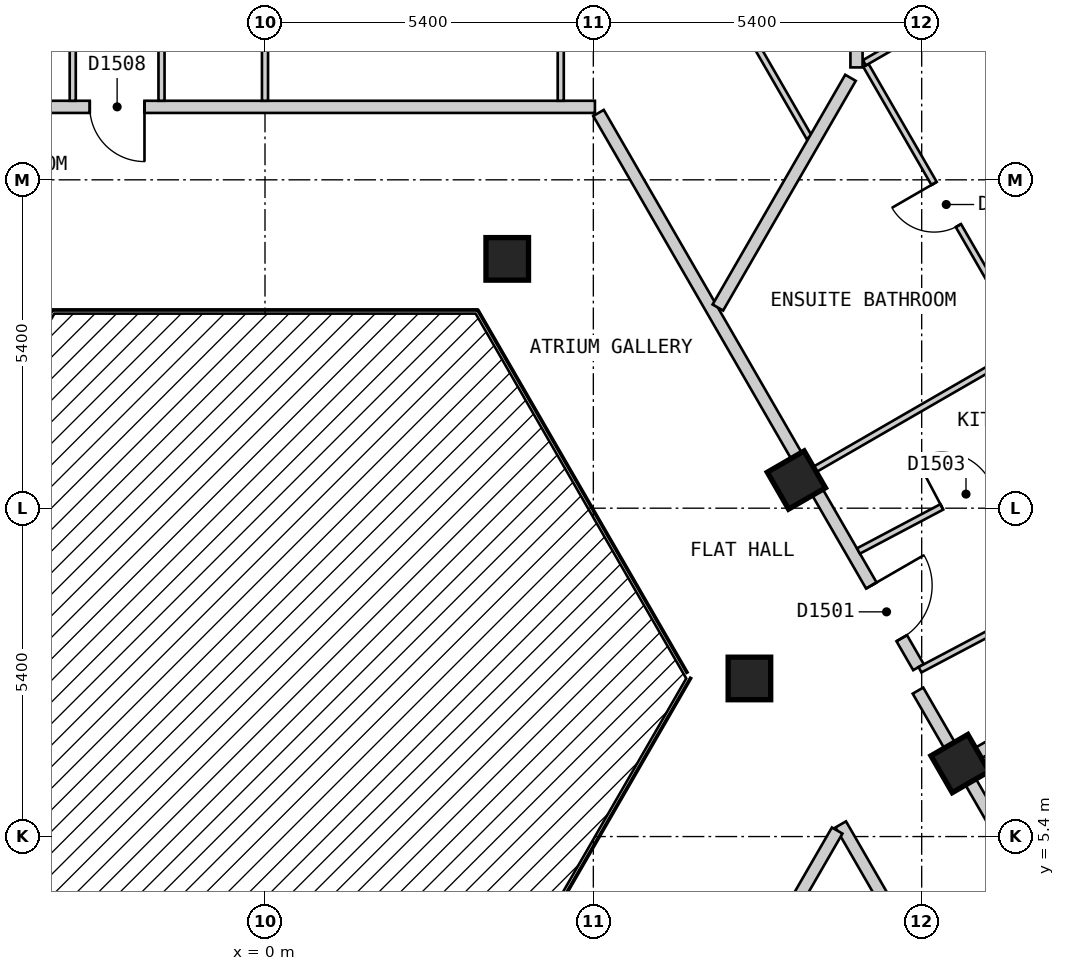
"""IFC4 building model, lengths in metres.
Left out: names, types, materials, properties, quantities, classifications, styles, units other than length and angle.
Written with IfcOpenShell. Run it as: python <this file> out.ifc"""

import sys

from ifc_helpers import new_model, si_unit, direction, frame, frame_2d, origin, origin_2d, place, context, subcontext, project, spatial, rectangle, extrude, element, fill, save


model = new_model("IFC4")
c1 = context("Model", 3, precision=1e-05, world=origin(), true_north=direction((0.0, 1.0)))
c2 = subcontext(c1, "Body", "Model", "MODEL_VIEW")
j1 = project(units=[si_unit("LENGTHUNIT", "METRE"), si_unit("PLANEANGLEUNIT", "RADIAN")], contexts=[c1])
p1 = place(None, origin())
s1 = spatial("IfcSite", under=j1, at=p1, CompositionType="ELEMENT")
p2 = place(p1, origin())
s2 = spatial("IfcBuilding", under=s1, at=p2, CompositionType="ELEMENT")
p3 = place(p2, frame((0.0, 0.0, 190.2)))
s3 = spatial("IfcBuildingStorey", under=s2, at=p3, CompositionType="ELEMENT", Elevation=190.2)
for number, where, z_axis, x_axis in (
    (1, (11.431, 6.6, 0.0), (0.0, 0.0, 1.0), (-0.5, 0.866, 0.0)),
    (2, (7.967, 8.0, 0.0), (0.0, 0.0, 1.0), (1.0, 0.0, 0.0)),
    (3, (8.739, 11.263, 0.0), (0.0, 0.0, 1.0), (-0.5, 0.866, 0.0)),
    (4, (3.984, 14.9, 0.0), (0.0, 0.0, 1.0), (1.0, 0.0, 0.0)),
):
    element("IfcColumn", number, at=place(p3, frame(where, z_axis=z_axis, x_axis=x_axis)), inside=s3, PredefinedType="COLUMN", context=c2, shape_type="SweptSolid", body=[
        extrude(rectangle(XDim=0.7, YDim=0.7, at=origin_2d()), origin(), (0.0, 0.0, 1.0), 3.0),
    ])
p4 = place(p3, frame((9.469, 5.6, 0.0), z_axis=(0.0, 0.0, 1.0), x_axis=(0.499964524401, -0.866045884662, 0.0)))
e5 = element("IfcWall", 5, at=p4, inside=s3, PredefinedType="PARTITIONING", context=c2, shape_type="SweptSolid", body=[
    extrude(rectangle(XDim=7.042, YDim=0.2, at=frame_2d((3.521, 0.0))), origin(), (0.0, 0.0, 1.0), 2.7),
])
p5 = place(p4, frame((3.129, 0.0, 0.0)))
e6 = element("IfcOpeningElement", 6, at=p5, cuts=e5, PredefinedType="OPENING", context=c2, shape_type="SweptSolid", body=[
    extrude(rectangle(XDim=0.9, YDim=2.1, at=frame_2d((0.45, 1.05))), frame((0.0, 0.11, 0.0), z_axis=(0.0, -1.0, 0.0), x_axis=(1.0, 0.0, 0.0)), (0.0, 0.0, 1.0), 0.22),
])
p6 = place(p3, frame((10.739, 7.8, 0.0), z_axis=(0.0, 0.0, 1.0), x_axis=(0.500023726918, -0.866011704609, 0.0)))
e7 = element("IfcWall", 7, at=p6, inside=s3, PredefinedType="PARTITIONING", context=c2, shape_type="SweptSolid", body=[
    extrude(rectangle(XDim=9.47, YDim=0.2, at=frame_2d((4.735, 0.0))), origin(), (0.0, 0.0, 1.0), 2.7),
])
p7 = place(p6, frame((8.168, 0.0, 0.0)))
e8 = element("IfcOpeningElement", 8, at=p7, cuts=e7, PredefinedType="OPENING", context=c2, shape_type="SweptSolid", body=[
    extrude(rectangle(XDim=1.0, YDim=2.1, at=frame_2d((0.5, 1.05))), frame((0.0, 0.11, 0.0), z_axis=(0.0, -1.0, 0.0), x_axis=(1.0, 0.0, 0.0)), (0.0, 0.0, 1.0), 0.22),
])
p8 = place(p6, frame((3.578, 0.0, 0.0)))
e9 = element("IfcOpeningElement", 9, at=p8, cuts=e7, PredefinedType="OPENING", context=c2, shape_type="SweptSolid", body=[
    extrude(rectangle(XDim=1.0, YDim=2.1, at=frame_2d((0.5, 1.05))), frame((0.0, 0.11, 0.0), z_axis=(0.0, -1.0, 0.0), x_axis=(1.0, 0.0, 0.0)), (0.0, 0.0, 1.0), 0.22),
])
p9 = place(p3, frame((5.485, 17.3, 0.0), z_axis=(0.0, 0.0, 1.0), x_axis=(0.499998905622, -0.866026035623, 0.0)))
e10 = element("IfcWall", 10, at=p9, inside=s3, PredefinedType="PARTITIONING", context=c2, shape_type="SweptSolid", body=[
    extrude(rectangle(XDim=10.524, YDim=0.2, at=frame_2d((5.262, 0.0))), origin(), (0.0, 0.0, 1.0), 2.7),
])
p10 = place(p9, frame((8.974, 0.0, 0.0)))
e11 = element("IfcOpeningElement", 11, at=p10, cuts=e10, PredefinedType="OPENING", context=c2, shape_type="SweptSolid", body=[
    extrude(rectangle(XDim=1.0, YDim=2.1, at=frame_2d((0.5, 1.05))), frame((0.0, 0.11, 0.0), z_axis=(0.0, -1.0, 0.0), x_axis=(1.0, 0.0, 0.0)), (0.0, 0.0, 1.0), 0.22),
])
p11 = place(p3, frame((-5.311, 17.4, 0.0), z_axis=(0.0, 0.0, 1.0), x_axis=(1.0, 0.0, 0.0)))
e12 = element("IfcWall", 12, at=p11, inside=s3, PredefinedType="PARTITIONING", context=c2, shape_type="SweptSolid", body=[
    extrude(rectangle(XDim=10.737, YDim=0.2, at=frame_2d((5.369, 0.0))), origin(), (0.0, 0.0, 1.0), 2.7),
])
p12 = place(p11, frame((2.429, 0.0, 0.0)))
e13 = element("IfcOpeningElement", 13, at=p12, cuts=e12, PredefinedType="OPENING", context=c2, shape_type="SweptSolid", body=[
    extrude(rectangle(XDim=0.9, YDim=2.1, at=frame_2d((0.45, 1.05))), frame((0.0, 0.11, 0.0), z_axis=(0.0, -1.0, 0.0), x_axis=(1.0, 0.0, 0.0)), (0.0, 0.0, 1.0), 0.22),
])
p13 = place(p3, frame((7.028, 1.373, 0.0), z_axis=(0.0, 0.0, 1.0), x_axis=(0.499953126767, 0.866052464367, 0.0)))
e14 = element("IfcWall", 14, at=p13, inside=s3, PredefinedType="PARTITIONING", context=c2, shape_type="SweptSolid", body=[
    extrude(rectangle(XDim=4.764, YDim=0.2, at=frame_2d((2.382, 0.0))), origin(), (0.0, 0.0, 1.0), 2.7),
])
p14 = place(p3, frame((7.073, 20.15, 0.0), z_axis=(0.0, 0.0, 1.0), x_axis=(0.499917691695, -0.866072919292, 0.0)))
e15 = element("IfcWall", 15, at=p14, inside=s3, PredefinedType="PARTITIONING", context=c2, shape_type="SweptSolid", body=[
    extrude(rectangle(XDim=3.753, YDim=0.1, at=frame_2d((1.876, 0.0))), origin(), (0.0, 0.0, 1.0), 2.7),
])
p15 = place(p14, frame((0.96, 0.0, 0.0)))
e16 = element("IfcOpeningElement", 16, at=p15, cuts=e15, PredefinedType="OPENING", context=c2, shape_type="SweptSolid", body=[
    extrude(rectangle(XDim=0.8, YDim=2.1, at=frame_2d((0.4, 1.05))), frame((0.0, 0.06, 0.0), z_axis=(0.0, -1.0, 0.0), x_axis=(1.0, 0.0, 0.0)), (0.0, 0.0, 1.0), 0.12),
])
p16 = place(p3, frame((9.883, 18.082, 0.0), z_axis=(0.0, 0.0, 1.0), x_axis=(0.500004428835, -0.86602284678, 0.0)))
e17 = element("IfcWall", 17, at=p16, inside=s3, PredefinedType="PARTITIONING", context=c2, shape_type="SweptSolid", body=[
    extrude(rectangle(XDim=10.618, YDim=0.1, at=frame_2d((5.309, 0.0))), origin(), (0.0, 0.0, 1.0), 2.7),
])
p17 = place(p16, frame((7.657, 0.0, 0.0)))
e18 = element("IfcOpeningElement", 18, at=p17, cuts=e17, PredefinedType="OPENING", context=c2, shape_type="SweptSolid", body=[
    extrude(rectangle(XDim=0.9, YDim=2.1, at=frame_2d((0.45, 1.05))), frame((0.0, 0.06, 0.0), z_axis=(0.0, -1.0, 0.0), x_axis=(1.0, 0.0, 0.0)), (0.0, 0.0, 1.0), 0.12),
])
p18 = place(p16, frame((2.242, 0.0, 0.0)))
e19 = element("IfcOpeningElement", 19, at=p18, cuts=e17, PredefinedType="OPENING", context=c2, shape_type="SweptSolid", body=[
    extrude(rectangle(XDim=0.8, YDim=2.1, at=frame_2d((0.4, 1.05))), frame((0.0, 0.06, 0.0), z_axis=(0.0, -1.0, 0.0), x_axis=(1.0, 0.0, 0.0)), (0.0, 0.0, 1.0), 0.12),
])
p19 = place(p3, frame((-1.702, 20.409, 0.0), z_axis=(0.0, 0.0, 1.0), x_axis=(0.0, -1.0, 0.0)))
e20 = element("IfcWall", 20, at=p19, inside=s3, PredefinedType="PARTITIONING", context=c2, shape_type="SweptSolid", body=[
    extrude(rectangle(XDim=2.909, YDim=0.1, at=frame_2d((1.455, 0.0))), origin(), (0.0, 0.0, 1.0), 2.7),
])
p20 = place(p19, frame((1.029, 0.0, 0.0)))
e21 = element("IfcOpeningElement", 21, at=p20, cuts=e20, PredefinedType="OPENING", context=c2, shape_type="SweptSolid", body=[
    extrude(rectangle(XDim=0.9, YDim=2.1, at=frame_2d((0.45, 1.05))), frame((0.0, 0.06, 0.0), z_axis=(0.0, -1.0, 0.0), x_axis=(1.0, 0.0, 0.0)), (0.0, 0.0, 1.0), 0.12),
])
p21 = place(p3, frame((4.864, 17.5, 0.0), z_axis=(0.0, 0.0, 1.0), x_axis=(0.0, 1.0, 0.0)))
e22 = element("IfcWall", 22, at=p21, inside=s3, PredefinedType="PARTITIONING", context=c2, shape_type="SweptSolid", body=[
    extrude(rectangle(XDim=2.7, YDim=0.1, at=frame_2d((1.35, 0.0))), origin(), (0.0, 0.0, 1.0), 2.7),
])
p22 = place(p3, frame((0.0, 17.5, 0.0), z_axis=(0.0, 0.0, 1.0), x_axis=(0.0, 1.0, 0.0)))
e23 = element("IfcWall", 23, at=p22, inside=s3, PredefinedType="PARTITIONING", context=c2, shape_type="SweptSolid", body=[
    extrude(rectangle(XDim=6.4, YDim=0.1, at=frame_2d((3.2, 0.0))), origin(), (0.0, 0.0, 1.0), 2.7),
])
p23 = place(p22, frame((4.1, 0.0, 0.0)))
e24 = element("IfcOpeningElement", 24, at=p23, cuts=e23, PredefinedType="OPENING", context=c2, shape_type="SweptSolid", body=[
    extrude(rectangle(XDim=0.9, YDim=2.1, at=frame_2d((0.45, 1.05))), frame((0.0, 0.06, 0.0), z_axis=(0.0, -1.0, 0.0), x_axis=(1.0, 0.0, 0.0)), (0.0, 0.0, 1.0), 0.12),
])
p24 = place(p3, frame((-3.162, 17.5, 0.0), z_axis=(0.0, 0.0, 1.0), x_axis=(0.0, 1.0, 0.0)))
e25 = element("IfcWall", 25, at=p24, inside=s3, PredefinedType="PARTITIONING", context=c2, shape_type="SweptSolid", body=[
    extrude(rectangle(XDim=2.91, YDim=0.1, at=frame_2d((1.455, 0.0))), origin(), (0.0, 0.0, 1.0), 2.7),
])
p25 = place(p24, frame((1.03, 0.0, 0.0)))
e26 = element("IfcOpeningElement", 26, at=p25, cuts=e25, PredefinedType="OPENING", context=c2, shape_type="SweptSolid", body=[
    extrude(rectangle(XDim=0.8, YDim=2.1, at=frame_2d((0.4, 1.05))), frame((0.0, 0.06, 0.0), z_axis=(0.0, -1.0, 0.0), x_axis=(1.0, 0.0, 0.0)), (0.0, 0.0, 1.0), 0.12),
])
p26 = place(p3, frame((9.76, 10.096, 0.0), z_axis=(0.0, 0.0, 1.0), x_axis=(0.883925629136, 0.467627503636, 0.0)))
e27 = element("IfcWall", 27, at=p26, inside=s3, PredefinedType="PARTITIONING", context=c2, shape_type="SweptSolid", body=[
    extrude(rectangle(XDim=4.052, YDim=0.1, at=frame_2d((2.026, 0.0))), origin(), (0.0, 0.0, 1.0), 2.7),
])
p27 = place(p26, frame((1.551, 0.0, 0.0)))
e28 = element("IfcOpeningElement", 28, at=p27, cuts=e27, PredefinedType="OPENING", context=c2, shape_type="SweptSolid", body=[
    extrude(rectangle(XDim=0.9, YDim=2.1, at=frame_2d((0.45, 1.05))), frame((0.0, 0.06, 0.0), z_axis=(0.0, -1.0, 0.0), x_axis=(1.0, 0.0, 0.0)), (0.0, 0.0, 1.0), 0.12),
])
p28 = place(p3, frame((10.772, 8.143, 0.0), z_axis=(0.0, 0.0, 1.0), x_axis=(0.884049480227, 0.467393320995, 0.0)))
e29 = element("IfcWall", 29, at=p28, inside=s3, PredefinedType="PARTITIONING", context=c2, shape_type="SweptSolid", body=[
    extrude(rectangle(XDim=4.153, YDim=0.1, at=frame_2d((2.076, 0.0))), origin(), (0.0, 0.0, 1.0), 2.7),
])
p29 = place(p28, frame((1.701, 0.0, 0.0)))
e30 = element("IfcOpeningElement", 30, at=p29, cuts=e29, PredefinedType="OPENING", context=c2, shape_type="SweptSolid", body=[
    extrude(rectangle(XDim=0.8, YDim=2.1, at=frame_2d((0.4, 1.05))), frame((0.0, 0.06, 0.0), z_axis=(0.0, -1.0, 0.0), x_axis=(1.0, 0.0, 0.0)), (0.0, 0.0, 1.0), 0.12),
])
p30 = place(p3, frame((8.999, 11.413, 0.0), z_axis=(0.0, 0.0, 1.0), x_axis=(0.86606561423, 0.499930346997, 0.0)))
e31 = element("IfcWall", 31, at=p30, inside=s3, PredefinedType="PARTITIONING", context=c2, shape_type="SweptSolid", body=[
    extrude(rectangle(XDim=4.1, YDim=0.1, at=frame_2d((2.05, 0.0))), origin(), (0.0, 0.0, 1.0), 2.7),
])
p31 = place(p3, frame((9.858, 18.125, 0.0), z_axis=(0.0, 0.0, 1.0), x_axis=(0.866004402611, 0.500036373335, 0.0)))
e32 = element("IfcWall", 32, at=p31, inside=s3, PredefinedType="PARTITIONING", context=c2, shape_type="SweptSolid", body=[
    extrude(rectangle(XDim=5.7, YDim=0.1, at=frame_2d((2.85, 0.0))), origin(), (0.0, 0.0, 1.0), 2.7),
])
p32 = place(p31, frame((2.4, 0.0, 0.0)))
e33 = element("IfcOpeningElement", 33, at=p32, cuts=e32, PredefinedType="OPENING", context=c2, shape_type="SweptSolid", body=[
    extrude(rectangle(XDim=0.9, YDim=2.1, at=frame_2d((0.45, 1.05))), frame((0.0, 0.06, 0.0), z_axis=(0.0, -1.0, 0.0), x_axis=(1.0, 0.0, 0.0)), (0.0, 0.0, 1.0), 0.12),
])
p33 = place(p3, frame((7.448, 14.1, 0.0), z_axis=(0.0, 0.0, 1.0), x_axis=(0.499961462843, 0.866047652079, 0.0)))
e34 = element("IfcWall", 34, at=p33, inside=s3, PredefinedType="PARTITIONING", context=c2, shape_type="SweptSolid", body=[
    extrude(rectangle(XDim=4.362, YDim=0.2, at=frame_2d((2.181, 0.0))), origin(), (0.0, 0.0, 1.0), 2.7),
])
p34 = place(p3, frame((9.728, 18.049, 0.0), z_axis=(0.0, 0.0, 1.0), x_axis=(0.0, 1.0, 0.0)))
e35 = element("IfcWall", 35, at=p34, inside=s3, PredefinedType="PARTITIONING", context=c2, shape_type="SweptSolid", body=[
    extrude(rectangle(XDim=5.851, YDim=0.2, at=frame_2d((2.925, 0.0))), origin(), (0.0, 0.0, 1.0), 2.7),
])
p35 = place(p3, frame((11.518, 6.65, 0.0), z_axis=(0.0, 0.0, 1.0), x_axis=(0.866016855193, 0.500014806302, 0.0)))
e36 = element("IfcWall", 36, at=p35, inside=s3, PredefinedType="PARTITIONING", context=c2, shape_type="SweptSolid", body=[
    extrude(rectangle(XDim=10.0, YDim=0.2, at=frame_2d((5.0, 0.0))), origin(), (0.0, 0.0, 1.0), 2.7),
])
p36 = place(p10, origin())
e37 = element("IfcDoor", 37, at=p36, inside=s3, OperationType="SINGLE_SWING_LEFT", PredefinedType="DOOR", context=c2, shape_type="SweptSolid", body=[
    extrude(rectangle(XDim=1.0, YDim=2.1, at=frame_2d((0.5, 1.05))), frame((0.0, 0.025, 0.0), z_axis=(0.0, -1.0, 0.0), x_axis=(1.0, 0.0, 0.0)), (0.0, 0.0, 1.0), 0.05),
])
fill(e11, e37)
p37 = place(p27, origin())
e38 = element("IfcDoor", 38, at=p37, inside=s3, OperationType="SINGLE_SWING_LEFT", PredefinedType="DOOR", context=c2, shape_type="SweptSolid", body=[
    extrude(rectangle(XDim=0.9, YDim=2.1, at=frame_2d((0.45, 1.05))), frame((0.0, 0.025, 0.0), z_axis=(0.0, -1.0, 0.0), x_axis=(1.0, 0.0, 0.0)), (0.0, 0.0, 1.0), 0.05),
])
fill(e28, e38)
p38 = place(p18, origin())
e39 = element("IfcDoor", 39, at=p38, inside=s3, OperationType="SINGLE_SWING_LEFT", PredefinedType="DOOR", context=c2, shape_type="SweptSolid", body=[
    extrude(rectangle(XDim=0.8, YDim=2.1, at=frame_2d((0.4, 1.05))), frame((0.0, 0.025, 0.0), z_axis=(0.0, -1.0, 0.0), x_axis=(1.0, 0.0, 0.0)), (0.0, 0.0, 1.0), 0.05),
])
fill(e19, e39)
p39 = place(p12, origin())
e40 = element("IfcDoor", 40, at=p39, inside=s3, OperationType="SINGLE_SWING_RIGHT", PredefinedType="DOOR", context=c2, shape_type="SweptSolid", body=[
    extrude(rectangle(XDim=0.9, YDim=2.1, at=frame_2d((0.45, 1.05))), frame((0.0, 0.025, 0.0), z_axis=(0.0, -1.0, 0.0), x_axis=(1.0, 0.0, 0.0)), (0.0, 0.0, 1.0), 0.05),
])
fill(e13, e40)
save(model, sys.argv[1])
